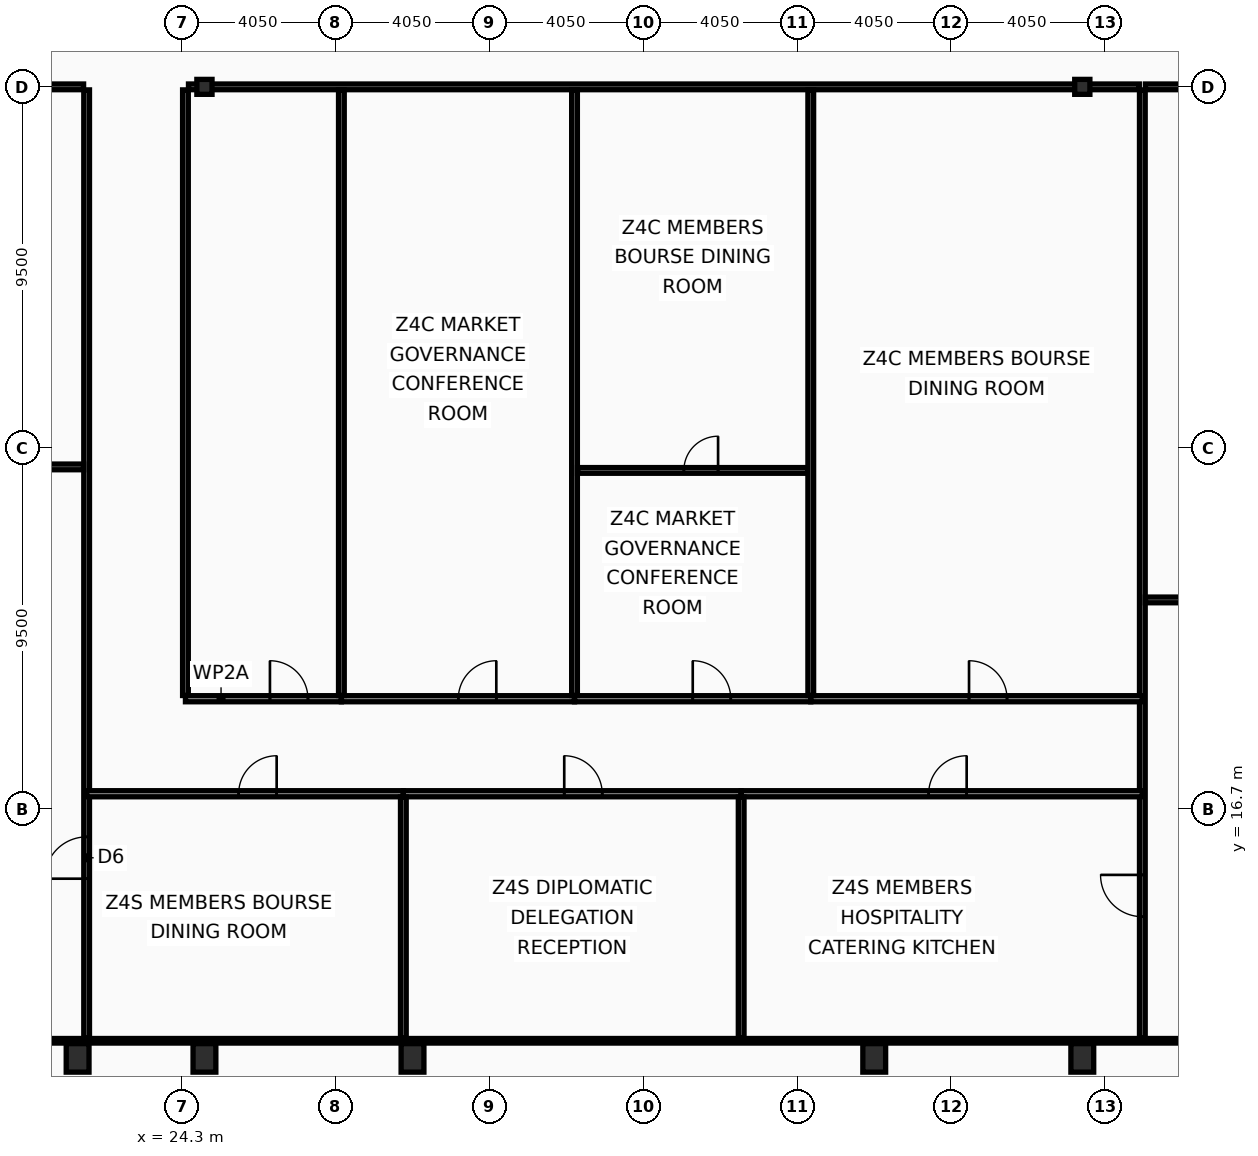
"""IFC4 building model, lengths in metres.
Left out: names, types, materials, properties, quantities, classifications, styles, units other than length and angle.
Written with IfcOpenShell. Run it as: python <this file> out.ifc"""

import sys

from ifc_helpers import new_model, si_unit, direction, frame, frame_2d, origin, origin_2d, place, context, subcontext, project, spatial, rectangle, hollow_rectangle, i_section, extrude, element, fill, save


model = new_model("IFC4")
c1 = context("Model", 3, precision=1e-05, world=origin(), true_north=direction((0.0, 1.0)))
c2 = subcontext(c1, "Body", "Model", "MODEL_VIEW")
j1 = project(units=[si_unit("LENGTHUNIT", "METRE"), si_unit("PLANEANGLEUNIT", "RADIAN")], contexts=[c1])
p1 = place(None, origin())
s1 = spatial("IfcSite", under=j1, at=p1, CompositionType="ELEMENT")
p2 = place(p1, origin())
s2 = spatial("IfcBuilding", under=s1, at=p2, CompositionType="ELEMENT")
p3 = place(p2, frame((0.0, 0.0, 287.8)))
s3 = spatial("IfcBuildingStorey", under=s2, at=p3, CompositionType="ELEMENT", Elevation=287.8)
for number, where, z_axis, x_axis in (
    (1, (21.562, 10.15, 0.0), (0.0, 0.0, 1.0), (1.0, 0.0, 0.0)),
    (2, (24.9, 10.15, 0.0), (0.0, 0.0, 1.0), (1.0, 0.0, 0.0)),
    (3, (30.375, 10.15, 0.0), (0.0, 0.0, 1.0), (1.0, 0.0, 0.0)),
    (4, (42.525, 10.15, 0.0), (0.0, 0.0, 1.0), (1.0, 0.0, 0.0)),
    (5, (48.0, 10.15, 0.0), (0.0, 0.0, 1.0), (1.0, 0.0, 0.0)),
):
    element("IfcColumn", number, at=place(p3, frame(where, z_axis=z_axis, x_axis=x_axis)), inside=s3, PredefinedType="COLUMN", context=c2, shape_type="SweptSolid", body=[
        extrude(hollow_rectangle(XDim=0.6, YDim=0.75, WallThickness=0.045, at=origin_2d()), origin(), (0.0, 0.0, 1.0), 3.6),
    ])
for number, where, z_axis, x_axis in (
    (6, (24.9, 35.7, 0.0), (0.0, 0.0, 1.0), (1.0, 0.0, 0.0)),
    (7, (48.0, 35.7, 0.0), (0.0, 0.0, 1.0), (1.0, 0.0, 0.0)),
):
    element("IfcColumn", number, at=place(p3, frame(where, z_axis=z_axis, x_axis=x_axis)), inside=s3, PredefinedType="COLUMN", context=c2, shape_type="SweptSolid", body=[
        extrude(i_section(OverallWidth=0.399, OverallDepth=0.393, WebThickness=0.023, FlangeThickness=0.037, at=origin_2d()), origin(), (0.0, 0.0, 1.0), 3.6),
    ])
p4 = place(p3, frame((21.8, 10.665, 0.0), z_axis=(0.0, 0.0, 1.0), x_axis=(0.0, 1.0, 0.0)))
e8 = element("IfcWall", 8, at=p4, inside=s3, PredefinedType="PARTITIONING", context=c2, shape_type="SweptSolid", body=[
    extrude(rectangle(XDim=24.955, YDim=0.15, at=frame_2d((12.478, 0.0))), origin(), (0.0, 0.0, 1.0), 3.03),
])
p5 = place(p4, frame((4.2, 0.0, 0.0)))
e9 = element("IfcOpeningElement", 9, at=p5, cuts=e8, PredefinedType="OPENING", context=c2, shape_type="SweptSolid", body=[
    extrude(rectangle(XDim=1.1, YDim=2.1, at=frame_2d((0.55, 1.05))), frame((0.0, 0.085, 0.0), z_axis=(0.0, -1.0, 0.0), x_axis=(1.0, 0.0, 0.0)), (0.0, 0.0, 1.0), 0.17),
])
p6 = place(p3, frame((10.095, 35.7, 0.0), z_axis=(0.0, 0.0, 1.0), x_axis=(1.0, 0.0, 0.0)))
e10 = element("IfcWall", 10, at=p6, inside=s3, PredefinedType="PARTITIONING", context=c2, shape_type="SweptSolid", body=[
    extrude(rectangle(XDim=11.625, YDim=0.15, at=frame_2d((5.812, 0.0))), origin(), (0.0, 0.0, 1.0), 2.09),
])
p7 = place(p6, frame((2.8, 0.0, 0.0)))
e11 = element("IfcOpeningElement", 11, at=p7, cuts=e10, PredefinedType="OPENING", context=c2, shape_type="SweptSolid", body=[
    extrude(rectangle(XDim=1.0, YDim=2.05, at=frame_2d((0.5, 1.025))), frame((0.0, 0.085, 0.0), z_axis=(0.0, -1.0, 0.0), x_axis=(1.0, 0.0, 0.0)), (0.0, 0.0, 1.0), 0.17),
])
p8 = place(p3, frame((10.095, 25.7, 0.0), z_axis=(0.0, 0.0, 1.0), x_axis=(1.0, 0.0, 0.0)))
e12 = element("IfcWall", 12, at=p8, inside=s3, PredefinedType="PARTITIONING", context=c2, shape_type="SweptSolid", body=[
    extrude(rectangle(XDim=11.625, YDim=0.15, at=frame_2d((5.812, 0.0))), origin(), (0.0, 0.0, 1.0), 2.53),
])
p9 = place(p8, frame((2.2, 0.0, 0.0)))
e13 = element("IfcOpeningElement", 13, at=p9, cuts=e12, PredefinedType="OPENING", context=c2, shape_type="SweptSolid", body=[
    extrude(rectangle(XDim=0.9, YDim=2.05, at=frame_2d((0.45, 1.025))), frame((0.0, 0.085, 0.0), z_axis=(0.0, -1.0, 0.0), x_axis=(1.0, 0.0, 0.0)), (0.0, 0.0, 1.0), 0.17),
])
p10 = place(p3, frame((24.4, 19.685, 0.0), z_axis=(0.0, 0.0, 1.0), x_axis=(0.0, 1.0, 0.0)))
e14 = element("IfcWall", 14, at=p10, inside=s3, PredefinedType="PARTITIONING", context=c2, shape_type="SweptSolid", body=[
    extrude(rectangle(XDim=15.935, YDim=0.15, at=frame_2d((7.968, 0.0))), origin(), (0.0, 0.0, 1.0), 2.78),
])
p11 = place(p3, frame((49.58, 10.665, 0.0), z_axis=(0.0, 0.0, 1.0), x_axis=(0.0, 1.0, 0.0)))
e15 = element("IfcWall", 15, at=p11, inside=s3, PredefinedType="PARTITIONING", context=c2, shape_type="SweptSolid", body=[
    extrude(rectangle(XDim=24.955, YDim=0.15, at=frame_2d((12.478, 0.0))), origin(), (0.0, 0.0, 1.0), 3.03),
])
p12 = place(p11, frame((3.2, 0.0, 0.0)))
e16 = element("IfcOpeningElement", 16, at=p12, cuts=e15, PredefinedType="OPENING", context=c2, shape_type="SweptSolid", body=[
    extrude(rectangle(XDim=1.1, YDim=2.1, at=frame_2d((0.55, 1.05))), frame((0.0, 0.085, 0.0), z_axis=(0.0, -1.0, 0.0), x_axis=(1.0, 0.0, 0.0)), (0.0, 0.0, 1.0), 0.17),
])
p13 = place(p3, frame((24.48, 35.7, 0.0), z_axis=(0.0, 0.0, 1.0), x_axis=(1.0, 0.0, 0.0)))
e17 = element("IfcWall", 17, at=p13, inside=s3, PredefinedType="PARTITIONING", context=c2, shape_type="SweptSolid", body=[
    extrude(rectangle(XDim=25.02, YDim=0.15, at=frame_2d((12.51, 0.0))), origin(), (0.0, 0.0, 1.0), 2.78),
])
p14 = place(p3, frame((49.66, 35.7, 0.0), z_axis=(0.0, 0.0, 1.0), x_axis=(1.0, 0.0, 0.0)))
e18 = element("IfcWall", 18, at=p14, inside=s3, PredefinedType="PARTITIONING", context=c2, shape_type="SweptSolid", body=[
    extrude(rectangle(XDim=13.145, YDim=0.15, at=frame_2d((6.573, 0.0))), origin(), (0.0, 0.0, 1.0), 2.09),
])
p15 = place(p14, frame((2.2, 0.0, 0.0)))
e19 = element("IfcOpeningElement", 19, at=p15, cuts=e18, PredefinedType="OPENING", context=c2, shape_type="SweptSolid", body=[
    extrude(rectangle(XDim=1.0, YDim=2.05, at=frame_2d((0.5, 1.025))), frame((0.0, 0.085, 0.0), z_axis=(0.0, -1.0, 0.0), x_axis=(1.0, 0.0, 0.0)), (0.0, 0.0, 1.0), 0.17),
])
p16 = place(p3, frame((49.66, 22.2, 0.0), z_axis=(0.0, 0.0, 1.0), x_axis=(1.0, 0.0, 0.0)))
e20 = element("IfcWall", 20, at=p16, inside=s3, PredefinedType="PARTITIONING", context=c2, shape_type="SweptSolid", body=[
    extrude(rectangle(XDim=13.145, YDim=0.15, at=frame_2d((6.573, 0.0))), origin(), (0.0, 0.0, 1.0), 2.53),
])
p17 = place(p16, frame((2.2, 0.0, 0.0)))
e21 = element("IfcOpeningElement", 21, at=p17, cuts=e20, PredefinedType="OPENING", context=c2, shape_type="SweptSolid", body=[
    extrude(rectangle(XDim=0.9, YDim=2.05, at=frame_2d((0.45, 1.025))), frame((0.0, 0.085, 0.0), z_axis=(0.0, -1.0, 0.0), x_axis=(1.0, 0.0, 0.0)), (0.0, 0.0, 1.0), 0.17),
])
p18 = place(p3, frame((24.4, 19.6, 0.0), z_axis=(0.0, 0.0, 1.0), x_axis=(1.0, 0.0, 0.0)))
e22 = element("IfcWall", 22, at=p18, inside=s3, PredefinedType="PARTITIONING", context=c2, shape_type="SweptSolid", body=[
    extrude(rectangle(XDim=4.104, YDim=0.16, at=frame_2d((2.052, 0.0))), origin(), (0.0, 0.0, 1.0), 2.78),
])
p19 = place(p18, frame((2.223, 0.0, 0.0)))
e23 = element("IfcOpeningElement", 23, at=p19, cuts=e22, PredefinedType="OPENING", context=c2, shape_type="SweptSolid", body=[
    extrude(rectangle(XDim=1.0, YDim=2.05, at=frame_2d((0.5, 1.025))), frame((0.0, 0.09, 0.0), z_axis=(0.0, -1.0, 0.0), x_axis=(1.0, 0.0, 0.0)), (0.0, 0.0, 1.0), 0.18),
])
p20 = place(p3, frame((28.503, 19.6, 0.0), z_axis=(0.0, 0.0, 1.0), x_axis=(1.0, 0.0, 0.0)))
e24 = element("IfcWall", 24, at=p20, inside=s3, PredefinedType="PARTITIONING", context=c2, shape_type="SweptSolid", body=[
    extrude(rectangle(XDim=6.135, YDim=0.16, at=frame_2d((3.067, 0.0))), origin(), (0.0, 0.0, 1.0), 2.78),
])
p21 = place(p20, frame((3.077, 0.0, 0.0)))
e25 = element("IfcOpeningElement", 25, at=p21, cuts=e24, PredefinedType="OPENING", context=c2, shape_type="SweptSolid", body=[
    extrude(rectangle(XDim=1.0, YDim=2.05, at=frame_2d((0.5, 1.025))), frame((0.0, 0.09, 0.0), z_axis=(0.0, -1.0, 0.0), x_axis=(1.0, 0.0, 0.0)), (0.0, 0.0, 1.0), 0.18),
])
p22 = place(p3, frame((28.503, 19.685, 0.0), z_axis=(0.0, 0.0, 1.0), x_axis=(0.0, 1.0, 0.0)))
e26 = element("IfcWall", 26, at=p22, inside=s3, PredefinedType="PARTITIONING", context=c2, shape_type="SweptSolid", body=[
    extrude(rectangle(XDim=15.935, YDim=0.15, at=frame_2d((7.968, 0.0))), origin(), (0.0, 0.0, 1.0), 3.03),
])
p23 = place(p3, frame((34.638, 19.6, 0.0), z_axis=(0.0, 0.0, 1.0), x_axis=(1.0, 0.0, 0.0)))
e27 = element("IfcWall", 27, at=p23, inside=s3, PredefinedType="PARTITIONING", context=c2, shape_type="SweptSolid", body=[
    extrude(rectangle(XDim=6.217, YDim=0.16, at=frame_2d((3.108, 0.0))), origin(), (0.0, 0.0, 1.0), 3.44),
])
p24 = place(p23, frame((3.111, 0.0, 0.0)))
e28 = element("IfcOpeningElement", 28, at=p24, cuts=e27, PredefinedType="OPENING", context=c2, shape_type="SweptSolid", body=[
    extrude(rectangle(XDim=1.0, YDim=2.05, at=frame_2d((0.5, 1.025))), frame((0.0, 0.09, 0.0), z_axis=(0.0, -1.0, 0.0), x_axis=(1.0, 0.0, 0.0)), (0.0, 0.0, 1.0), 0.18),
])
p25 = place(p3, frame((34.638, 19.685, 0.0), z_axis=(0.0, 0.0, 1.0), x_axis=(0.0, 1.0, 0.0)))
e29 = element("IfcWall", 29, at=p25, inside=s3, PredefinedType="PARTITIONING", context=c2, shape_type="SweptSolid", body=[
    extrude(rectangle(XDim=15.935, YDim=0.15, at=frame_2d((7.968, 0.0))), origin(), (0.0, 0.0, 1.0), 3.03),
])
p26 = place(p3, frame((34.718, 25.607, 0.0), z_axis=(0.0, 0.0, 1.0), x_axis=(1.0, 0.0, 0.0)))
e30 = element("IfcWall", 30, at=p26, inside=s3, PredefinedType="PARTITIONING", context=c2, shape_type="SweptSolid", body=[
    extrude(rectangle(XDim=6.057, YDim=0.15, at=frame_2d((3.028, 0.0))), origin(), (0.0, 0.0, 1.0), 3.44),
])
p27 = place(p26, frame((2.798, 0.0, 0.0)))
e31 = element("IfcOpeningElement", 31, at=p27, cuts=e30, PredefinedType="OPENING", context=c2, shape_type="SweptSolid", body=[
    extrude(rectangle(XDim=0.9, YDim=2.05, at=frame_2d((0.45, 1.025))), frame((0.0, 0.085, 0.0), z_axis=(0.0, -1.0, 0.0), x_axis=(1.0, 0.0, 0.0)), (0.0, 0.0, 1.0), 0.17),
])
p28 = place(p3, frame((40.855, 19.6, 0.0), z_axis=(0.0, 0.0, 1.0), x_axis=(1.0, 0.0, 0.0)))
e32 = element("IfcWall", 32, at=p28, inside=s3, PredefinedType="PARTITIONING", context=c2, shape_type="SweptSolid", body=[
    extrude(rectangle(XDim=8.725, YDim=0.16, at=frame_2d((4.363, 0.0))), origin(), (0.0, 0.0, 1.0), 2.78),
])
p29 = place(p28, frame((4.165, 0.0, 0.0)))
e33 = element("IfcOpeningElement", 33, at=p29, cuts=e32, PredefinedType="OPENING", context=c2, shape_type="SweptSolid", body=[
    extrude(rectangle(XDim=1.0, YDim=2.05, at=frame_2d((0.5, 1.025))), frame((0.0, 0.09, 0.0), z_axis=(0.0, -1.0, 0.0), x_axis=(1.0, 0.0, 0.0)), (0.0, 0.0, 1.0), 0.18),
])
p30 = place(p3, frame((40.855, 19.685, 0.0), z_axis=(0.0, 0.0, 1.0), x_axis=(0.0, 1.0, 0.0)))
e34 = element("IfcWall", 34, at=p30, inside=s3, PredefinedType="PARTITIONING", context=c2, shape_type="SweptSolid", body=[
    extrude(rectangle(XDim=15.935, YDim=0.15, at=frame_2d((7.968, 0.0))), origin(), (0.0, 0.0, 1.0), 3.03),
])
p31 = place(p3, frame((21.8, 17.1, 0.0), z_axis=(0.0, 0.0, 1.0), x_axis=(1.0, 0.0, 0.0)))
e35 = element("IfcWall", 35, at=p31, inside=s3, PredefinedType="PARTITIONING", context=c2, shape_type="SweptSolid", body=[
    extrude(rectangle(XDim=8.334, YDim=0.16, at=frame_2d((4.167, 0.0))), origin(), (0.0, 0.0, 1.0), 2.78),
])
p32 = place(p31, frame((4.0, 0.0, 0.0)))
e36 = element("IfcOpeningElement", 36, at=p32, cuts=e35, PredefinedType="OPENING", context=c2, shape_type="SweptSolid", body=[
    extrude(rectangle(XDim=1.0, YDim=2.05, at=frame_2d((0.5, 1.025))), frame((0.0, 0.09, 0.0), z_axis=(0.0, -1.0, 0.0), x_axis=(1.0, 0.0, 0.0)), (0.0, 0.0, 1.0), 0.18),
])
p33 = place(p3, frame((30.134, 17.1, 0.0), z_axis=(0.0, 0.0, 1.0), x_axis=(1.0, 0.0, 0.0)))
e37 = element("IfcWall", 37, at=p33, inside=s3, PredefinedType="PARTITIONING", context=c2, shape_type="SweptSolid", body=[
    extrude(rectangle(XDim=8.89, YDim=0.16, at=frame_2d((4.445, 0.0))), origin(), (0.0, 0.0, 1.0), 2.78),
])
p34 = place(p33, frame((4.234, 0.0, 0.0)))
e38 = element("IfcOpeningElement", 38, at=p34, cuts=e37, PredefinedType="OPENING", context=c2, shape_type="SweptSolid", body=[
    extrude(rectangle(XDim=1.0, YDim=2.05, at=frame_2d((0.5, 1.025))), frame((0.0, 0.09, 0.0), z_axis=(0.0, -1.0, 0.0), x_axis=(1.0, 0.0, 0.0)), (0.0, 0.0, 1.0), 0.18),
])
p35 = place(p3, frame((30.134, 10.665, 0.0), z_axis=(0.0, 0.0, 1.0), x_axis=(0.0, 1.0, 0.0)))
e39 = element("IfcWall", 39, at=p35, inside=s3, PredefinedType="PARTITIONING", context=c2, shape_type="SweptSolid", body=[
    extrude(rectangle(XDim=6.35, YDim=0.15, at=frame_2d((3.175, 0.0))), origin(), (0.0, 0.0, 1.0), 2.78),
])
p36 = place(p3, frame((39.024, 17.1, 0.0), z_axis=(0.0, 0.0, 1.0), x_axis=(1.0, 0.0, 0.0)))
e40 = element("IfcWall", 40, at=p36, inside=s3, PredefinedType="PARTITIONING", context=c2, shape_type="SweptSolid", body=[
    extrude(rectangle(XDim=10.556, YDim=0.16, at=frame_2d((5.278, 0.0))), origin(), (0.0, 0.0, 1.0), 2.78),
])
p37 = place(p36, frame((4.934, 0.0, 0.0)))
e41 = element("IfcOpeningElement", 41, at=p37, cuts=e40, PredefinedType="OPENING", context=c2, shape_type="SweptSolid", body=[
    extrude(rectangle(XDim=1.0, YDim=2.05, at=frame_2d((0.5, 1.025))), frame((0.0, 0.09, 0.0), z_axis=(0.0, -1.0, 0.0), x_axis=(1.0, 0.0, 0.0)), (0.0, 0.0, 1.0), 0.18),
])
p38 = place(p3, frame((39.024, 10.665, 0.0), z_axis=(0.0, 0.0, 1.0), x_axis=(0.0, 1.0, 0.0)))
e42 = element("IfcWall", 42, at=p38, inside=s3, PredefinedType="PARTITIONING", context=c2, shape_type="SweptSolid", body=[
    extrude(rectangle(XDim=6.35, YDim=0.15, at=frame_2d((3.175, 0.0))), origin(), (0.0, 0.0, 1.0), 3.03),
])
p39 = place(p3, frame((10.095, 10.6, 0.0), z_axis=(0.0, 0.0, 1.0), x_axis=(1.0, 0.0, 0.0)))
e43 = element("IfcWall", 43, at=p39, inside=s3, PredefinedType="PARTITIONING", context=c2, shape_type="SweptSolid", body=[
    extrude(rectangle(XDim=52.71, YDim=0.12, at=frame_2d((26.355, 0.0))), origin(), (0.0, 0.0, 1.0), 2.09),
])
p40 = place(p5, origin())
e44 = element("IfcDoor", 44, at=p40, inside=s3, OperationType="SINGLE_SWING_LEFT", PredefinedType="DOOR", context=c2, shape_type="SweptSolid", body=[
    extrude(rectangle(XDim=1.1, YDim=2.1, at=frame_2d((0.55, 1.05))), frame((0.0, 0.025, 0.0), z_axis=(0.0, -1.0, 0.0), x_axis=(1.0, 0.0, 0.0)), (0.0, 0.0, 1.0), 0.05),
])
fill(e9, e44)
p41 = place(p12, origin())
e45 = element("IfcDoor", 45, at=p41, inside=s3, OperationType="SINGLE_SWING_RIGHT", PredefinedType="DOOR", context=c2, shape_type="SweptSolid", body=[
    extrude(rectangle(XDim=1.1, YDim=2.1, at=frame_2d((0.55, 1.05))), frame((0.0, 0.025, 0.0), z_axis=(0.0, -1.0, 0.0), x_axis=(1.0, 0.0, 0.0)), (0.0, 0.0, 1.0), 0.05),
])
fill(e16, e45)
p42 = place(p19, origin())
e46 = element("IfcDoor", 46, at=p42, inside=s3, OperationType="SINGLE_SWING_LEFT", PredefinedType="DOOR", context=c2, shape_type="SweptSolid", body=[
    extrude(rectangle(XDim=1.0, YDim=2.05, at=frame_2d((0.5, 1.025))), frame((0.0, 0.025, 0.0), z_axis=(0.0, -1.0, 0.0), x_axis=(1.0, 0.0, 0.0)), (0.0, 0.0, 1.0), 0.05),
])
fill(e23, e46)
p43 = place(p21, origin())
e47 = element("IfcDoor", 47, at=p43, inside=s3, OperationType="SINGLE_SWING_RIGHT", PredefinedType="DOOR", context=c2, shape_type="SweptSolid", body=[
    extrude(rectangle(XDim=1.0, YDim=2.05, at=frame_2d((0.5, 1.025))), frame((0.0, 0.025, 0.0), z_axis=(0.0, -1.0, 0.0), x_axis=(1.0, 0.0, 0.0)), (0.0, 0.0, 1.0), 0.05),
])
fill(e25, e47)
p44 = place(p24, origin())
e48 = element("IfcDoor", 48, at=p44, inside=s3, OperationType="SINGLE_SWING_LEFT", PredefinedType="DOOR", context=c2, shape_type="SweptSolid", body=[
    extrude(rectangle(XDim=1.0, YDim=2.05, at=frame_2d((0.5, 1.025))), frame((0.0, 0.025, 0.0), z_axis=(0.0, -1.0, 0.0), x_axis=(1.0, 0.0, 0.0)), (0.0, 0.0, 1.0), 0.05),
])
fill(e28, e48)
p45 = place(p27, origin())
e49 = element("IfcDoor", 49, at=p45, inside=s3, OperationType="SINGLE_SWING_RIGHT", PredefinedType="DOOR", context=c2, shape_type="SweptSolid", body=[
    extrude(rectangle(XDim=0.9, YDim=2.05, at=frame_2d((0.45, 1.025))), frame((0.0, 0.025, 0.0), z_axis=(0.0, -1.0, 0.0), x_axis=(1.0, 0.0, 0.0)), (0.0, 0.0, 1.0), 0.05),
])
fill(e31, e49)
p46 = place(p29, origin())
e50 = element("IfcDoor", 50, at=p46, inside=s3, OperationType="SINGLE_SWING_LEFT", PredefinedType="DOOR", context=c2, shape_type="SweptSolid", body=[
    extrude(rectangle(XDim=1.0, YDim=2.05, at=frame_2d((0.5, 1.025))), frame((0.0, 0.025, 0.0), z_axis=(0.0, -1.0, 0.0), x_axis=(1.0, 0.0, 0.0)), (0.0, 0.0, 1.0), 0.05),
])
fill(e33, e50)
p47 = place(p32, origin())
e51 = element("IfcDoor", 51, at=p47, inside=s3, OperationType="SINGLE_SWING_RIGHT", PredefinedType="DOOR", context=c2, shape_type="SweptSolid", body=[
    extrude(rectangle(XDim=1.0, YDim=2.05, at=frame_2d((0.5, 1.025))), frame((0.0, 0.025, 0.0), z_axis=(0.0, -1.0, 0.0), x_axis=(1.0, 0.0, 0.0)), (0.0, 0.0, 1.0), 0.05),
])
fill(e36, e51)
p48 = place(p34, origin())
e52 = element("IfcDoor", 52, at=p48, inside=s3, OperationType="SINGLE_SWING_LEFT", PredefinedType="DOOR", context=c2, shape_type="SweptSolid", body=[
    extrude(rectangle(XDim=1.0, YDim=2.05, at=frame_2d((0.5, 1.025))), frame((0.0, 0.025, 0.0), z_axis=(0.0, -1.0, 0.0), x_axis=(1.0, 0.0, 0.0)), (0.0, 0.0, 1.0), 0.05),
])
fill(e38, e52)
p49 = place(p37, origin())
e53 = element("IfcDoor", 53, at=p49, inside=s3, OperationType="SINGLE_SWING_RIGHT", PredefinedType="DOOR", context=c2, shape_type="SweptSolid", body=[
    extrude(rectangle(XDim=1.0, YDim=2.05, at=frame_2d((0.5, 1.025))), frame((0.0, 0.025, 0.0), z_axis=(0.0, -1.0, 0.0), x_axis=(1.0, 0.0, 0.0)), (0.0, 0.0, 1.0), 0.05),
])
fill(e41, e53)
save(model, sys.argv[1])
